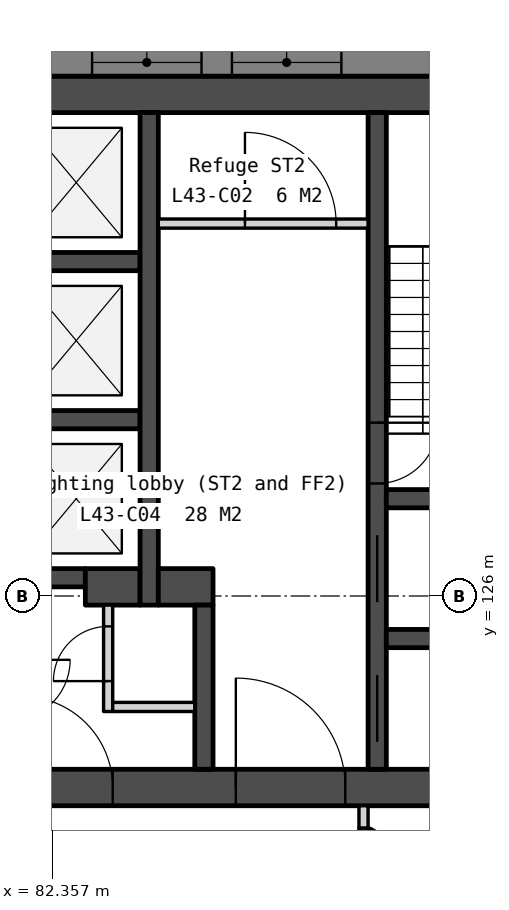
"""IFC4 building model, lengths in metres.
Left out: names, types, materials, properties, quantities, classifications, styles, units other than length and angle.
Written with IfcOpenShell. Run it as: python <this file> out.ifc"""

import sys

from ifc_helpers import new_model, si_unit, direction, frame, frame_2d, origin, place, context, subcontext, project, spatial, polyline, rectangle, outline, extrude, element, fill, save


model = new_model("IFC4")
c1 = context("Model", 3, precision=1e-05, world=origin(), true_north=direction((0.0, 1.0)))
c2 = subcontext(c1, "Body", "Model", "MODEL_VIEW")
j1 = project(units=[si_unit("LENGTHUNIT", "METRE"), si_unit("PLANEANGLEUNIT", "RADIAN")], contexts=[c1])
p1 = place(None, origin())
s1 = spatial("IfcSite", under=j1, at=p1, CompositionType="ELEMENT")
p2 = place(p1, origin())
s2 = spatial("IfcBuilding", under=s1, at=p2, CompositionType="ELEMENT")
p3 = place(p2, frame((0.0, 0.0, 171.5)))
s3 = spatial("IfcBuildingStorey", under=s2, at=p3, CompositionType="ELEMENT", Elevation=171.5)
p4 = place(p3, frame((69.0, 134.25, 0.0), z_axis=(0.0, 0.0, 1.0), x_axis=(1.0, 0.0, 0.0)))
e1 = element("IfcWall", 1, at=p4, inside=s3, PredefinedType="SOLIDWALL", context=c2, shape_type="SweptSolid", body=[
    extrude(rectangle(XDim=22.0, YDim=0.6, at=frame_2d((11.0, 0.0))), origin(), (0.0, 0.0, 1.0), 3.65),
])
p5 = place(p3, frame((69.0, 122.85, 0.0), z_axis=(0.0, 0.0, 1.0), x_axis=(1.0, 0.0, 0.0)))
e2 = element("IfcWall", 2, at=p5, inside=s3, PredefinedType="SOLIDWALL", context=c2, shape_type="SweptSolid", body=[
    extrude(rectangle(XDim=22.0, YDim=0.6, at=frame_2d((11.0, 0.0))), origin(), (0.0, 0.0, 1.0), 3.65),
])
p6 = place(p5, frame((16.375, 0.0, 0.0)))
e3 = element("IfcOpeningElement", 3, at=p6, cuts=e2, PredefinedType="OPENING", context=c2, shape_type="SweptSolid", body=[
    extrude(rectangle(XDim=1.8, YDim=2.1, at=frame_2d((0.9, 1.05))), frame((0.0, 0.31, 0.0), z_axis=(0.0, -1.0, 0.0), x_axis=(1.0, 0.0, 0.0)), (0.0, 0.0, 1.0), 0.62),
])
p7 = place(p5, frame((3.825, 0.0, 0.0)))
e4 = element("IfcOpeningElement", 4, at=p7, cuts=e2, PredefinedType="OPENING", context=c2, shape_type="SweptSolid", body=[
    extrude(rectangle(XDim=1.8, YDim=2.1, at=frame_2d((0.9, 1.05))), frame((0.0, 0.31, 0.0), z_axis=(0.0, -1.0, 0.0), x_axis=(1.0, 0.0, 0.0)), (0.0, 0.0, 1.0), 0.62),
])
p8 = place(p5, frame((12.85, 0.0, 0.0)))
e5 = element("IfcOpeningElement", 5, at=p8, cuts=e2, PredefinedType="OPENING", context=c2, shape_type="SweptSolid", body=[
    extrude(rectangle(XDim=1.5, YDim=2.1, at=frame_2d((0.75, 1.05))), frame((0.0, 0.31, 0.0), z_axis=(0.0, -1.0, 0.0), x_axis=(1.0, 0.0, 0.0)), (0.0, 0.0, 1.0), 0.62),
])
for number, where, z_axis, x_axis in (
    (6, (81.7, 131.5, 0.0), (0.0, 0.0, 1.0), (1.0, 0.0, 0.0)),
    (7, (81.7, 128.9, 0.0), (0.0, 0.0, 1.0), (1.0, 0.0, 0.0)),
):
    element("IfcWall", number, at=place(p3, frame(where, z_axis=z_axis, x_axis=x_axis)), inside=s3, PredefinedType="SOLIDWALL", context=c2, shape_type="SweptSolid", body=[
        extrude(rectangle(XDim=2.1, YDim=0.3, at=frame_2d((1.05, 0.0))), origin(), (0.0, 0.0, 1.0), 3.65),
    ])
p9 = place(p3, frame((81.7, 126.3, 0.0), z_axis=(0.0, 0.0, 1.0), x_axis=(1.0, 0.0, 0.0)))
e8 = element("IfcWall", 8, at=p9, inside=s3, PredefinedType="SOLIDWALL", context=c2, shape_type="SweptSolid", body=[
    extrude(rectangle(XDim=1.2, YDim=0.3, at=frame_2d((0.6, 0.0))), origin(), (0.0, 0.0, 1.0), 3.65),
])
p10 = place(p3, frame((82.9, 126.15, 0.0), z_axis=(0.0, 0.0, 1.0), x_axis=(1.0, 0.0, 0.0)))
e9 = element("IfcWall", 9, at=p10, inside=s3, PredefinedType="SOLIDWALL", context=c2, shape_type="SweptSolid", body=[
    extrude(rectangle(XDim=0.9, YDim=0.6, at=frame_2d((0.45, 0.0))), origin(), (0.0, 0.0, 1.0), 3.65),
])
p11 = place(p3, frame((83.275, 125.85, 0.0), z_axis=(0.0, 0.0, 1.0), x_axis=(0.0, -1.0, 0.0)))
e10 = element("IfcWall", 10, at=p11, inside=s3, PredefinedType="PARTITIONING", context=c2, shape_type="SweptSolid", body=[
    extrude(rectangle(XDim=1.75, YDim=0.15, at=frame_2d((0.875, 0.0))), origin(), (0.0, 0.0, 1.0), 3.65),
])
p12 = place(p11, frame((0.35, 0.0, 0.0)))
e11 = element("IfcOpeningElement", 11, at=p12, cuts=e10, PredefinedType="OPENING", context=c2, shape_type="SweptSolid", body=[
    extrude(rectangle(XDim=0.9, YDim=2.1, at=frame_2d((0.45, 1.05))), frame((0.0, 0.085, 0.0), z_axis=(0.0, -1.0, 0.0), x_axis=(1.0, 0.0, 0.0)), (0.0, 0.0, 1.0), 0.17),
])
p13 = place(p3, frame((83.35, 124.175, 0.0), z_axis=(0.0, 0.0, 1.0), x_axis=(1.0, 0.0, 0.0)))
e12 = element("IfcWall", 12, at=p13, inside=s3, PredefinedType="PARTITIONING", context=c2, shape_type="SweptSolid", body=[
    extrude(rectangle(XDim=1.35, YDim=0.15, at=frame_2d((0.675, 0.0))), origin(), (0.0, 0.0, 1.0), 3.65),
])
p14 = place(p3, frame((83.95, 133.95, 0.0), z_axis=(0.0, 0.0, 1.0), x_axis=(0.0, -1.0, 0.0)))
e13 = element("IfcWall", 13, at=p14, inside=s3, PredefinedType="SOLIDWALL", context=c2, shape_type="SweptSolid", body=[
    extrude(rectangle(XDim=8.1, YDim=0.3, at=frame_2d((4.05, 0.0))), origin(), (0.0, 0.0, 1.0), 3.65),
])
p15 = place(p3, frame((84.1, 132.125, 0.0), z_axis=(0.0, 0.0, 1.0), x_axis=(1.0, 0.0, 0.0)))
e14 = element("IfcWall", 14, at=p15, inside=s3, PredefinedType="PARTITIONING", context=c2, shape_type="SweptSolid", body=[
    extrude(rectangle(XDim=3.45, YDim=0.15, at=frame_2d((1.725, 0.0))), origin(), (0.0, 0.0, 1.0), 3.65),
])
p16 = place(p15, frame((1.425, 0.0, 0.0)))
e15 = element("IfcOpeningElement", 15, at=p16, cuts=e14, PredefinedType="OPENING", context=c2, shape_type="SweptSolid", body=[
    extrude(rectangle(XDim=1.5, YDim=2.1, at=frame_2d((0.75, 1.05))), frame((0.0, 0.085, 0.0), z_axis=(0.0, -1.0, 0.0), x_axis=(1.0, 0.0, 0.0)), (0.0, 0.0, 1.0), 0.17),
])
p17 = place(p3, frame((84.1, 126.15, 0.0), z_axis=(0.0, 0.0, 1.0), x_axis=(1.0, 0.0, 0.0)))
e16 = element("IfcWall", 16, at=p17, inside=s3, PredefinedType="SOLIDWALL", context=c2, shape_type="SweptSolid", body=[
    extrude(rectangle(XDim=0.9, YDim=0.6, at=frame_2d((0.45, 0.0))), origin(), (0.0, 0.0, 1.0), 3.65),
])
p18 = place(p3, frame((84.85, 125.85, 0.0), z_axis=(0.0, 0.0, 1.0), x_axis=(0.0, -1.0, 0.0)))
e17 = element("IfcWall", 17, at=p18, inside=s3, PredefinedType="SOLIDWALL", context=c2, shape_type="SweptSolid", body=[
    extrude(rectangle(XDim=2.7, YDim=0.3, at=frame_2d((1.35, 0.0))), origin(), (0.0, 0.0, 1.0), 3.65),
])
p19 = place(p3, frame((87.7, 133.95, 0.0), z_axis=(0.0, 0.0, 1.0), x_axis=(0.0, -1.0, 0.0)))
e18 = element("IfcWall", 18, at=p19, inside=s3, PredefinedType="SOLIDWALL", context=c2, shape_type="SweptSolid", body=[
    extrude(rectangle(XDim=10.8, YDim=0.3, at=frame_2d((5.4, 0.0))), origin(), (0.0, 0.0, 1.0), 3.65),
])
p20 = place(p19, frame((6.95, 0.0, 0.0)))
e19 = element("IfcOpeningElement", 19, at=p20, cuts=e18, PredefinedType="OPENING", context=c2, shape_type="SweptSolid", body=[
    extrude(rectangle(XDim=1.1, YDim=2.1, at=frame_2d((0.55, 1.05))), frame((0.0, 0.16, 0.0), z_axis=(0.0, -1.0, 0.0), x_axis=(1.0, 0.0, 0.0)), (0.0, 0.0, 1.0), 0.32),
])
p21 = place(p19, frame((5.1, 0.0, 0.0)))
e20 = element("IfcOpeningElement", 20, at=p21, cuts=e18, PredefinedType="OPENING", context=c2, shape_type="SweptSolid", body=[
    extrude(rectangle(XDim=1.0, YDim=2.1, at=frame_2d((0.5, 1.05))), frame((0.0, 0.16, 0.0), z_axis=(0.0, -1.0, 0.0), x_axis=(1.0, 0.0, 0.0)), (0.0, 0.0, 1.0), 0.32),
])
p22 = place(p19, frame((9.25, 0.0, 0.0)))
e21 = element("IfcOpeningElement", 21, at=p22, cuts=e18, PredefinedType="OPENING", context=c2, shape_type="SweptSolid", body=[
    extrude(rectangle(XDim=1.1, YDim=2.1, at=frame_2d((0.55, 1.05))), frame((0.0, 0.16, 0.0), z_axis=(0.0, -1.0, 0.0), x_axis=(1.0, 0.0, 0.0)), (0.0, 0.0, 1.0), 0.32),
])
for number, where, z_axis, x_axis in (
    (22, (87.85, 127.6, 0.0), (0.0, 0.0, 1.0), (1.0, 0.0, 0.0)),
    (23, (87.85, 125.3, 0.0), (0.0, 0.0, 1.0), (1.0, 0.0, 0.0)),
):
    element("IfcWall", number, at=place(p3, frame(where, z_axis=z_axis, x_axis=x_axis)), inside=s3, PredefinedType="SOLIDWALL", context=c2, shape_type="SweptSolid", body=[
        extrude(rectangle(XDim=2.55, YDim=0.3, at=frame_2d((1.275, 0.0))), origin(), (0.0, 0.0, 1.0), 3.65),
    ])
p23 = place(p3, frame((100.243, 134.775, -0.15), z_axis=(0.0, 0.0, 1.0), x_axis=(-1.0, 0.0, 0.0)))
e24 = element("IfcWall", 24, at=p23, inside=s3, PredefinedType="SOLIDWALL", context=c2, shape_type="SweptSolid", body=[
    extrude(outline(polyline([(40.486, 0.0), (40.486, 3.8), (0.0, 3.8), (0.0, 0.0), (40.486, 0.0)])), frame((0.0, 0.225, 0.0), z_axis=(0.0, -1.0, 0.0), x_axis=(1.0, 0.0, 0.0)), (0.0, 0.0, 1.0), 0.45),
])
p24 = place(p23, frame((3.011, 0.0, 0.95)))
e25 = element("IfcOpeningElement", 25, at=p24, cuts=e24, PredefinedType="OPENING", context=c2, shape_type="SweptSolid", body=[
    extrude(rectangle(XDim=1.8, YDim=2.2, at=frame_2d((0.9, 1.1))), frame((0.0, 0.235, 0.0), z_axis=(0.0, -1.0, 0.0), x_axis=(1.0, 0.0, 0.0)), (0.0, 0.0, 1.0), 0.47),
])
p25 = place(p23, frame((5.311, 0.0, 0.95)))
e26 = element("IfcOpeningElement", 26, at=p25, cuts=e24, PredefinedType="OPENING", context=c2, shape_type="SweptSolid", body=[
    extrude(rectangle(XDim=1.8, YDim=2.2, at=frame_2d((0.9, 1.1))), frame((0.0, 0.235, 0.0), z_axis=(0.0, -1.0, 0.0), x_axis=(1.0, 0.0, 0.0)), (0.0, 0.0, 1.0), 0.47),
])
p26 = place(p23, frame((13.132, 0.0, 0.95)))
e27 = element("IfcOpeningElement", 27, at=p26, cuts=e24, PredefinedType="OPENING", context=c2, shape_type="SweptSolid", body=[
    extrude(rectangle(XDim=1.8, YDim=2.2, at=frame_2d((0.9, 1.1))), frame((0.0, 0.235, 0.0), z_axis=(0.0, -1.0, 0.0), x_axis=(1.0, 0.0, 0.0)), (0.0, 0.0, 1.0), 0.47),
])
p27 = place(p23, frame((15.432, 0.0, 0.95)))
e28 = element("IfcOpeningElement", 28, at=p27, cuts=e24, PredefinedType="OPENING", context=c2, shape_type="SweptSolid", body=[
    extrude(rectangle(XDim=1.8, YDim=2.2, at=frame_2d((0.9, 1.1))), frame((0.0, 0.235, 0.0), z_axis=(0.0, -1.0, 0.0), x_axis=(1.0, 0.0, 0.0)), (0.0, 0.0, 1.0), 0.47),
])
p28 = place(p23, frame((23.254, 0.0, 0.95)))
e29 = element("IfcOpeningElement", 29, at=p28, cuts=e24, PredefinedType="OPENING", context=c2, shape_type="SweptSolid", body=[
    extrude(rectangle(XDim=1.8, YDim=2.2, at=frame_2d((0.9, 1.1))), frame((0.0, 0.235, 0.0), z_axis=(0.0, -1.0, 0.0), x_axis=(1.0, 0.0, 0.0)), (0.0, 0.0, 1.0), 0.47),
])
p29 = place(p23, frame((25.554, 0.0, 0.95)))
e30 = element("IfcOpeningElement", 30, at=p29, cuts=e24, PredefinedType="OPENING", context=c2, shape_type="SweptSolid", body=[
    extrude(rectangle(XDim=1.8, YDim=2.2, at=frame_2d((0.9, 1.1))), frame((0.0, 0.235, 0.0), z_axis=(0.0, -1.0, 0.0), x_axis=(1.0, 0.0, 0.0)), (0.0, 0.0, 1.0), 0.47),
])
p30 = place(p23, frame((33.375, 0.0, 0.95)))
e31 = element("IfcOpeningElement", 31, at=p30, cuts=e24, PredefinedType="OPENING", context=c2, shape_type="SweptSolid", body=[
    extrude(rectangle(XDim=1.8, YDim=2.2, at=frame_2d((0.9, 1.1))), frame((0.0, 0.235, 0.0), z_axis=(0.0, -1.0, 0.0), x_axis=(1.0, 0.0, 0.0)), (0.0, 0.0, 1.0), 0.47),
])
p31 = place(p23, frame((35.675, 0.0, 0.95)))
e32 = element("IfcOpeningElement", 32, at=p31, cuts=e24, PredefinedType="OPENING", context=c2, shape_type="SweptSolid", body=[
    extrude(rectangle(XDim=1.8, YDim=2.2, at=frame_2d((0.9, 1.1))), frame((0.0, 0.235, 0.0), z_axis=(0.0, -1.0, 0.0), x_axis=(1.0, 0.0, 0.0)), (0.0, 0.0, 1.0), 0.47),
])
p32 = place(p3, frame((82.105, 96.067, -0.15), z_axis=(0.0, 0.0, 1.0), x_axis=(0.499997369791, 0.866026922331, 0.0)))
e33 = element("IfcWall", 33, at=p32, inside=s3, PredefinedType="SOLIDWALL", context=c2, shape_type="SweptSolid", body=[
    extrude(outline(polyline([(40.486, 0.0), (40.486, 3.8), (0.0, 3.8), (0.0, 0.0), (40.486, 0.0)])), frame((0.0, 0.225, 0.0), z_axis=(0.0, -1.0, 0.0), x_axis=(1.0, 0.0, 0.0)), (0.0, 0.0, 1.0), 0.45),
])
p33 = place(p32, frame((3.011, 0.0, 0.95)))
e34 = element("IfcOpeningElement", 34, at=p33, cuts=e33, PredefinedType="OPENING", context=c2, shape_type="SweptSolid", body=[
    extrude(rectangle(XDim=1.8, YDim=2.2, at=frame_2d((0.9, 1.1))), frame((0.0, 0.235, 0.0), z_axis=(0.0, -1.0, 0.0), x_axis=(1.0, 0.0, 0.0)), (0.0, 0.0, 1.0), 0.47),
])
p34 = place(p32, frame((5.311, 0.0, 0.95)))
e35 = element("IfcOpeningElement", 35, at=p34, cuts=e33, PredefinedType="OPENING", context=c2, shape_type="SweptSolid", body=[
    extrude(rectangle(XDim=1.8, YDim=2.2, at=frame_2d((0.9, 1.1))), frame((0.0, 0.235, 0.0), z_axis=(0.0, -1.0, 0.0), x_axis=(1.0, 0.0, 0.0)), (0.0, 0.0, 1.0), 0.47),
])
p35 = place(p32, frame((13.132, 0.0, 0.95)))
e36 = element("IfcOpeningElement", 36, at=p35, cuts=e33, PredefinedType="OPENING", context=c2, shape_type="SweptSolid", body=[
    extrude(rectangle(XDim=1.8, YDim=2.2, at=frame_2d((0.9, 1.1))), frame((0.0, 0.235, 0.0), z_axis=(0.0, -1.0, 0.0), x_axis=(1.0, 0.0, 0.0)), (0.0, 0.0, 1.0), 0.47),
])
p36 = place(p32, frame((15.432, 0.0, 0.95)))
e37 = element("IfcOpeningElement", 37, at=p36, cuts=e33, PredefinedType="OPENING", context=c2, shape_type="SweptSolid", body=[
    extrude(rectangle(XDim=1.8, YDim=2.2, at=frame_2d((0.9, 1.1))), frame((0.0, 0.235, 0.0), z_axis=(0.0, -1.0, 0.0), x_axis=(1.0, 0.0, 0.0)), (0.0, 0.0, 1.0), 0.47),
])
p37 = place(p32, frame((23.254, 0.0, 0.95)))
e38 = element("IfcOpeningElement", 38, at=p37, cuts=e33, PredefinedType="OPENING", context=c2, shape_type="SweptSolid", body=[
    extrude(rectangle(XDim=1.8, YDim=2.2, at=frame_2d((0.9, 1.1))), frame((0.0, 0.235, 0.0), z_axis=(0.0, -1.0, 0.0), x_axis=(1.0, 0.0, 0.0)), (0.0, 0.0, 1.0), 0.47),
])
p38 = place(p32, frame((25.554, 0.0, 0.95)))
e39 = element("IfcOpeningElement", 39, at=p38, cuts=e33, PredefinedType="OPENING", context=c2, shape_type="SweptSolid", body=[
    extrude(rectangle(XDim=1.8, YDim=2.2, at=frame_2d((0.9, 1.1))), frame((0.0, 0.235, 0.0), z_axis=(0.0, -1.0, 0.0), x_axis=(1.0, 0.0, 0.0)), (0.0, 0.0, 1.0), 0.47),
])
p39 = place(p32, frame((33.375, 0.0, 0.95)))
e40 = element("IfcOpeningElement", 40, at=p39, cuts=e33, PredefinedType="OPENING", context=c2, shape_type="SweptSolid", body=[
    extrude(rectangle(XDim=1.8, YDim=2.2, at=frame_2d((0.9, 1.1))), frame((0.0, 0.235, 0.0), z_axis=(0.0, -1.0, 0.0), x_axis=(1.0, 0.0, 0.0)), (0.0, 0.0, 1.0), 0.47),
])
p40 = place(p32, frame((35.675, 0.0, 0.95)))
e41 = element("IfcOpeningElement", 41, at=p40, cuts=e33, PredefinedType="OPENING", context=c2, shape_type="SweptSolid", body=[
    extrude(rectangle(XDim=1.8, YDim=2.2, at=frame_2d((0.9, 1.1))), frame((0.0, 0.235, 0.0), z_axis=(0.0, -1.0, 0.0), x_axis=(1.0, 0.0, 0.0)), (0.0, 0.0, 1.0), 0.47),
])
p41 = place(p3, frame((87.557, 122.137, 0.0), z_axis=(0.0, 0.0, 1.0), x_axis=(0.866029768103, -0.499992440702, 0.0)))
e42 = element("IfcWall", 42, at=p41, inside=s3, PredefinedType="PARTITIONING", context=c2, shape_type="SweptSolid", body=[
    extrude(rectangle(XDim=8.089, YDim=0.1, at=frame_2d((4.044, 0.0))), origin(), (0.0, 0.0, 1.0), 3.65),
])
p42 = place(p41, frame((3.594, 0.0, 0.0)))
e43 = element("IfcOpeningElement", 43, at=p42, cuts=e42, PredefinedType="OPENING", context=c2, shape_type="SweptSolid", body=[
    extrude(rectangle(XDim=0.9, YDim=2.1, at=frame_2d((0.45, 1.05))), frame((0.0, 0.06, 0.0), z_axis=(0.0, -1.0, 0.0), x_axis=(1.0, 0.0, 0.0)), (0.0, 0.0, 1.0), 0.12),
])
p43 = place(p3, frame((87.475, 120.05, 0.0), z_axis=(0.0, 0.0, 1.0), x_axis=(0.0, 1.0, 0.0)))
e44 = element("IfcWall", 44, at=p43, inside=s3, PredefinedType="PARTITIONING", context=c2, shape_type="SweptSolid", body=[
    extrude(rectangle(XDim=2.135, YDim=0.15, at=frame_2d((1.067, 0.0))), origin(), (0.0, 0.0, 1.0), 3.65),
])
p44 = place(p43, frame((0.567, 0.0, 0.0)))
e45 = element("IfcOpeningElement", 45, at=p44, cuts=e44, PredefinedType="OPENING", context=c2, shape_type="SweptSolid", body=[
    extrude(rectangle(XDim=1.0, YDim=2.1, at=frame_2d((0.5, 1.05))), frame((0.0, 0.085, 0.0), z_axis=(0.0, -1.0, 0.0), x_axis=(1.0, 0.0, 0.0)), (0.0, 0.0, 1.0), 0.17),
])
p45 = place(p3, frame((87.475, 122.185, 0.0), z_axis=(0.0, 0.0, 1.0), x_axis=(0.0, 1.0, 0.0)))
e46 = element("IfcWall", 46, at=p45, inside=s3, PredefinedType="PARTITIONING", context=c2, shape_type="SweptSolid", body=[
    extrude(rectangle(XDim=0.365, YDim=0.15, at=frame_2d((0.183, 0.0))), origin(), (0.0, 0.0, 1.0), 3.65),
])
p46 = place(p20, origin())
e47 = element("IfcDoor", 47, at=p46, inside=s3, OperationType="SLIDING_TO_LEFT", PredefinedType="DOOR", context=c2, shape_type="SweptSolid", body=[
    extrude(rectangle(XDim=1.1, YDim=2.1, at=frame_2d((0.55, 1.05))), frame((0.0, 0.025, 0.0), z_axis=(0.0, -1.0, 0.0), x_axis=(1.0, 0.0, 0.0)), (0.0, 0.0, 1.0), 0.05),
])
fill(e19, e47)
p47 = place(p6, origin())
e48 = element("IfcDoor", 48, at=p47, inside=s3, OperationType="DOUBLE_DOOR_DOUBLE_SWING", PredefinedType="DOOR", context=c2, shape_type="SweptSolid", body=[
    extrude(rectangle(XDim=1.8, YDim=2.1, at=frame_2d((0.9, 1.05))), frame((0.0, 0.025, 0.0), z_axis=(0.0, -1.0, 0.0), x_axis=(1.0, 0.0, 0.0)), (0.0, 0.0, 1.0), 0.05),
])
fill(e3, e48)
p48 = place(p8, origin())
e49 = element("IfcDoor", 49, at=p48, inside=s3, OperationType="DOUBLE_DOOR_DOUBLE_SWING", PredefinedType="DOOR", context=c2, shape_type="SweptSolid", body=[
    extrude(rectangle(XDim=1.5, YDim=2.1, at=frame_2d((0.75, 1.05))), frame((0.0, 0.025, 0.0), z_axis=(0.0, -1.0, 0.0), x_axis=(1.0, 0.0, 0.0)), (0.0, 0.0, 1.0), 0.05),
])
fill(e5, e49)
p49 = place(p12, origin())
e50 = element("IfcDoor", 50, at=p49, inside=s3, OperationType="SINGLE_SWING_RIGHT", PredefinedType="DOOR", context=c2, shape_type="SweptSolid", body=[
    extrude(rectangle(XDim=0.9, YDim=2.1, at=frame_2d((0.45, 1.05))), frame((0.0, 0.025, 0.0), z_axis=(0.0, -1.0, 0.0), x_axis=(1.0, 0.0, 0.0)), (0.0, 0.0, 1.0), 0.05),
])
fill(e11, e50)
p50 = place(p16, origin())
e51 = element("IfcDoor", 51, at=p50, inside=s3, OperationType="DOUBLE_DOOR_DOUBLE_SWING", PredefinedType="DOOR", context=c2, shape_type="SweptSolid", body=[
    extrude(rectangle(XDim=1.5, YDim=2.1, at=frame_2d((0.75, 1.05))), frame((0.0, 0.025, 0.0), z_axis=(0.0, -1.0, 0.0), x_axis=(1.0, 0.0, 0.0)), (0.0, 0.0, 1.0), 0.05),
])
fill(e15, e51)
p51 = place(p21, origin())
e52 = element("IfcDoor", 52, at=p51, inside=s3, OperationType="SINGLE_SWING_LEFT", PredefinedType="DOOR", context=c2, shape_type="SweptSolid", body=[
    extrude(rectangle(XDim=1.0, YDim=2.1, at=frame_2d((0.5, 1.05))), frame((0.0, 0.025, 0.0), z_axis=(0.0, -1.0, 0.0), x_axis=(1.0, 0.0, 0.0)), (0.0, 0.0, 1.0), 0.05),
])
fill(e20, e52)
p52 = place(p22, origin())
e53 = element("IfcDoor", 53, at=p52, inside=s3, OperationType="SLIDING_TO_LEFT", PredefinedType="DOOR", context=c2, shape_type="SweptSolid", body=[
    extrude(rectangle(XDim=1.1, YDim=2.1, at=frame_2d((0.55, 1.05))), frame((0.0, 0.025, 0.0), z_axis=(0.0, -1.0, 0.0), x_axis=(1.0, 0.0, 0.0)), (0.0, 0.0, 1.0), 0.05),
])
fill(e21, e53)
p53 = place(p26, origin())
e54 = element("IfcWindow", 54, at=p53, inside=s3, PartitioningType="SINGLE_PANEL", PredefinedType="WINDOW", context=c2, shape_type="SweptSolid", body=[
    extrude(rectangle(XDim=1.8, YDim=2.2, at=frame_2d((0.9, 1.1))), frame((0.0, 0.03, 0.0), z_axis=(0.0, -1.0, 0.0), x_axis=(1.0, 0.0, 0.0)), (0.0, 0.0, 1.0), 0.06),
])
fill(e27, e54)
p54 = place(p27, origin())
e55 = element("IfcWindow", 55, at=p54, inside=s3, PartitioningType="SINGLE_PANEL", PredefinedType="WINDOW", context=c2, shape_type="SweptSolid", body=[
    extrude(rectangle(XDim=1.8, YDim=2.2, at=frame_2d((0.9, 1.1))), frame((0.0, 0.03, 0.0), z_axis=(0.0, -1.0, 0.0), x_axis=(1.0, 0.0, 0.0)), (0.0, 0.0, 1.0), 0.06),
])
fill(e28, e55)
save(model, sys.argv[1])
